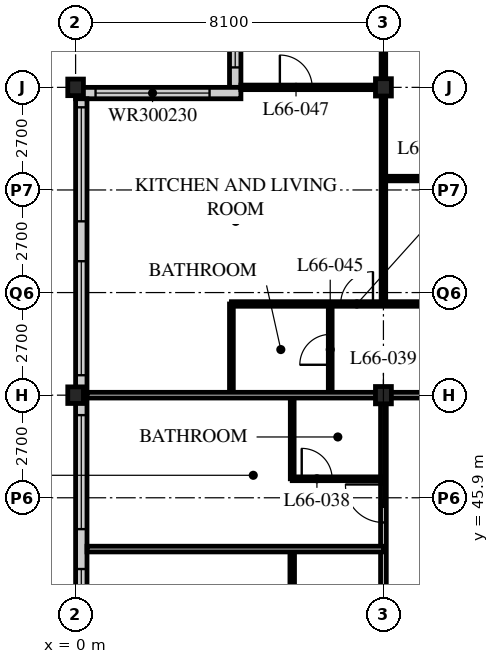
"""IFC4 building model, lengths in metres.
Left out: names, types, materials, properties, quantities, classifications, styles, units other than length and angle.
Written with IfcOpenShell. Run it as: python <this file> out.ifc"""

import sys

from ifc_helpers import new_model, si_unit, direction, frame, frame_2d, origin, origin_2d, place, context, subcontext, project, spatial, rectangle, i_section, extrude, element, fill, save


model = new_model("IFC4")
c1 = context("Model", 3, precision=1e-05, world=origin(), true_north=direction((0.0, 1.0)))
c2 = subcontext(c1, "Body", "Model", "MODEL_VIEW")
j1 = project(units=[si_unit("LENGTHUNIT", "METRE"), si_unit("PLANEANGLEUNIT", "RADIAN")], contexts=[c1])
p1 = place(None, origin())
s1 = spatial("IfcSite", under=j1, at=p1, CompositionType="ELEMENT")
p2 = place(p1, origin())
s2 = spatial("IfcBuilding", under=s1, at=p2, CompositionType="ELEMENT")
p3 = place(p2, frame((0.0, 0.0, 258.0)))
s3 = spatial("IfcBuildingStorey", under=s2, at=p3, CompositionType="ELEMENT", Elevation=258.0)
for number, where, z_axis, x_axis in (
    (1, (0.0, 48.6, 0.0), (0.0, 0.0, 1.0), (1.0, 0.0, 0.0)),
    (2, (0.0, 56.7, 0.0), (0.0, 0.0, 1.0), (1.0, 0.0, 0.0)),
):
    element("IfcColumn", number, at=place(p3, frame(where, z_axis=z_axis, x_axis=x_axis)), inside=s3, PredefinedType="COLUMN", context=c2, shape_type="SweptSolid", body=[
        extrude(i_section(OverallWidth=0.412, OverallDepth=0.437, WebThickness=0.036, FlangeThickness=0.058, FilletRadius=0.015, at=origin_2d()), origin(), (0.0, 0.0, 1.0), 3.9),
    ])
for number, where, z_axis, x_axis in (
    (3, (8.1, 48.6, 0.0), (0.0, 0.0, 1.0), (1.0, 0.0, 0.0)),
    (4, (8.1, 56.7, 0.0), (0.0, 0.0, 1.0), (1.0, 0.0, 0.0)),
):
    element("IfcColumn", number, at=place(p3, frame(where, z_axis=z_axis, x_axis=x_axis)), inside=s3, PredefinedType="COLUMN", context=c2, shape_type="SweptSolid", body=[
        extrude(i_section(OverallWidth=0.418, OverallDepth=0.456, WebThickness=0.042, FlangeThickness=0.067, FilletRadius=0.015, at=origin_2d()), origin(), (0.0, 0.0, 1.0), 3.9),
    ])
p4 = place(p3, frame((4.2, 60.45, 0.0), z_axis=(0.0, 0.0, 1.0), x_axis=(0.0, -1.0, 0.0)))
e5 = element("IfcWall", 5, at=p4, inside=s3, PredefinedType="SOLIDWALL", context=c2, shape_type="SweptSolid", body=[
    extrude(rectangle(XDim=3.75, YDim=0.3, at=frame_2d((1.875, 0.0))), origin(), (0.0, 0.0, 1.0), 3.69),
])
p5 = place(p4, frame((0.225, 0.0, 0.6)))
e6 = element("IfcOpeningElement", 6, at=p5, cuts=e5, PredefinedType="OPENING", context=c2, shape_type="SweptSolid", body=[
    extrude(rectangle(XDim=3.0, YDim=2.3, at=frame_2d((1.5, 1.15))), frame((0.0, 0.16, 0.0), z_axis=(0.0, -1.0, 0.0), x_axis=(1.0, 0.0, 0.0)), (0.0, 0.0, 1.0), 0.32),
])
p6 = place(p3, frame((4.35, 56.55, 0.0), z_axis=(0.0, 0.0, 1.0), x_axis=(-1.0, 0.0, 0.0)))
e7 = element("IfcWall", 7, at=p6, inside=s3, PredefinedType="SOLIDWALL", context=c2, shape_type="SweptSolid", body=[
    extrude(rectangle(XDim=4.35, YDim=0.3, at=frame_2d((2.175, 0.0))), origin(), (0.0, 0.0, 1.0), 3.69),
])
p7 = place(p6, frame((0.825, 0.0, 0.6)))
e8 = element("IfcOpeningElement", 8, at=p7, cuts=e7, PredefinedType="OPENING", context=c2, shape_type="SweptSolid", body=[
    extrude(rectangle(XDim=3.0, YDim=2.3, at=frame_2d((1.5, 1.15))), frame((0.0, 0.16, 0.0), z_axis=(0.0, -1.0, 0.0), x_axis=(1.0, 0.0, 0.0)), (0.0, 0.0, 1.0), 0.32),
])
p8 = place(p3, frame((0.15, 56.4, 0.0), z_axis=(0.0, 0.0, 1.0), x_axis=(0.0, -1.0, 0.0)))
e9 = element("IfcWall", 9, at=p8, inside=s3, PredefinedType="SOLIDWALL", context=c2, shape_type="SweptSolid", body=[
    extrude(rectangle(XDim=32.1, YDim=0.3, at=frame_2d((16.05, 0.0))), origin(), (0.0, 0.0, 1.0), 3.69),
])
p9 = place(p8, frame((0.225, 0.0, 0.6)))
e10 = element("IfcOpeningElement", 10, at=p9, cuts=e9, PredefinedType="OPENING", context=c2, shape_type="SweptSolid", body=[
    extrude(rectangle(XDim=3.0, YDim=2.4, at=frame_2d((1.5, 1.2))), frame((0.0, 0.16, 0.0), z_axis=(0.0, -1.0, 0.0), x_axis=(1.0, 0.0, 0.0)), (0.0, 0.0, 1.0), 0.32),
])
p10 = place(p8, frame((4.275, 0.0, 0.6)))
e11 = element("IfcOpeningElement", 11, at=p10, cuts=e9, PredefinedType="OPENING", context=c2, shape_type="SweptSolid", body=[
    extrude(rectangle(XDim=3.0, YDim=2.4, at=frame_2d((1.5, 1.2))), frame((0.0, 0.16, 0.0), z_axis=(0.0, -1.0, 0.0), x_axis=(1.0, 0.0, 0.0)), (0.0, 0.0, 1.0), 0.32),
])
p11 = place(p8, frame((8.325, 0.0, 0.6)))
e12 = element("IfcOpeningElement", 12, at=p11, cuts=e9, PredefinedType="OPENING", context=c2, shape_type="SweptSolid", body=[
    extrude(rectangle(XDim=3.0, YDim=2.4, at=frame_2d((1.5, 1.2))), frame((0.0, 0.16, 0.0), z_axis=(0.0, -1.0, 0.0), x_axis=(1.0, 0.0, 0.0)), (0.0, 0.0, 1.0), 0.32),
])
p12 = place(p8, frame((12.375, 0.0, 0.6)))
e13 = element("IfcOpeningElement", 13, at=p12, cuts=e9, PredefinedType="OPENING", context=c2, shape_type="SweptSolid", body=[
    extrude(rectangle(XDim=3.0, YDim=2.4, at=frame_2d((1.5, 1.2))), frame((0.0, 0.16, 0.0), z_axis=(0.0, -1.0, 0.0), x_axis=(1.0, 0.0, 0.0)), (0.0, 0.0, 1.0), 0.32),
])
p13 = place(p8, frame((16.425, 0.0, 0.6)))
e14 = element("IfcOpeningElement", 14, at=p13, cuts=e9, PredefinedType="OPENING", context=c2, shape_type="SweptSolid", body=[
    extrude(rectangle(XDim=3.0, YDim=2.4, at=frame_2d((1.5, 1.2))), frame((0.0, 0.16, 0.0), z_axis=(0.0, -1.0, 0.0), x_axis=(1.0, 0.0, 0.0)), (0.0, 0.0, 1.0), 0.32),
])
p14 = place(p8, frame((20.475, 0.0, 0.6)))
e15 = element("IfcOpeningElement", 15, at=p14, cuts=e9, PredefinedType="OPENING", context=c2, shape_type="SweptSolid", body=[
    extrude(rectangle(XDim=3.0, YDim=2.4, at=frame_2d((1.5, 1.2))), frame((0.0, 0.16, 0.0), z_axis=(0.0, -1.0, 0.0), x_axis=(1.0, 0.0, 0.0)), (0.0, 0.0, 1.0), 0.32),
])
p15 = place(p8, frame((24.525, 0.0, 0.6)))
e16 = element("IfcOpeningElement", 16, at=p15, cuts=e9, PredefinedType="OPENING", context=c2, shape_type="SweptSolid", body=[
    extrude(rectangle(XDim=3.0, YDim=2.4, at=frame_2d((1.5, 1.2))), frame((0.0, 0.16, 0.0), z_axis=(0.0, -1.0, 0.0), x_axis=(1.0, 0.0, 0.0)), (0.0, 0.0, 1.0), 0.32),
])
p16 = place(p8, frame((28.575, 0.0, 0.6)))
e17 = element("IfcOpeningElement", 17, at=p16, cuts=e9, PredefinedType="OPENING", context=c2, shape_type="SweptSolid", body=[
    extrude(rectangle(XDim=3.0, YDim=2.4, at=frame_2d((1.5, 1.2))), frame((0.0, 0.16, 0.0), z_axis=(0.0, -1.0, 0.0), x_axis=(1.0, 0.0, 0.0)), (0.0, 0.0, 1.0), 0.32),
])
p17 = place(p3, frame((8.1, 48.6, 0.0), z_axis=(0.0, 0.0, 1.0), x_axis=(1.0, 0.0, 0.0)))
e18 = element("IfcWall", 18, at=p17, inside=s3, PredefinedType="PARTITIONING", context=c2, shape_type="SweptSolid", body=[
    extrude(rectangle(XDim=28.35, YDim=0.15, at=frame_2d((14.175, 0.0))), origin(), (0.0, 0.0, 1.0), 3.078),
])
p18 = place(p17, frame((4.45, 0.0, 0.0)))
e19 = element("IfcOpeningElement", 19, at=p18, cuts=e18, PredefinedType="OPENING", context=c2, shape_type="SweptSolid", body=[
    extrude(rectangle(XDim=1.0, YDim=2.1, at=frame_2d((0.5, 1.05))), frame((0.0, 0.085, 0.0), z_axis=(0.0, -1.0, 0.0), x_axis=(1.0, 0.0, 0.0)), (0.0, 0.0, 1.0), 0.17),
])
p19 = place(p17, frame((20.65, 0.0, 0.0)))
e20 = element("IfcOpeningElement", 20, at=p19, cuts=e18, PredefinedType="OPENING", context=c2, shape_type="SweptSolid", body=[
    extrude(rectangle(XDim=1.0, YDim=2.1, at=frame_2d((0.5, 1.05))), frame((0.0, 0.085, 0.0), z_axis=(0.0, -1.0, 0.0), x_axis=(1.0, 0.0, 0.0)), (0.0, 0.0, 1.0), 0.17),
])
p20 = place(p17, frame((1.525, 0.0, 0.0)))
e21 = element("IfcOpeningElement", 21, at=p20, cuts=e18, PredefinedType="OPENING", context=c2, shape_type="SweptSolid", body=[
    extrude(rectangle(XDim=1.0, YDim=2.1, at=frame_2d((0.5, 1.05))), frame((0.0, 0.085, 0.0), z_axis=(0.0, -1.0, 0.0), x_axis=(1.0, 0.0, 0.0)), (0.0, 0.0, 1.0), 0.17),
])
p21 = place(p3, frame((8.1, 22.5, 0.0), z_axis=(0.0, 0.0, 1.0), x_axis=(0.0, 1.0, 0.0)))
e22 = element("IfcWall", 22, at=p21, inside=s3, PredefinedType="PARTITIONING", context=c2, shape_type="SweptSolid", body=[
    extrude(rectangle(XDim=26.1, YDim=0.15, at=frame_2d((13.05, 0.0))), origin(), (0.0, 0.0, 1.0), 3.078),
])
p22 = place(p21, frame((2.65, 0.0, 0.0)))
e23 = element("IfcOpeningElement", 23, at=p22, cuts=e22, PredefinedType="OPENING", context=c2, shape_type="SweptSolid", body=[
    extrude(rectangle(XDim=1.0, YDim=2.1, at=frame_2d((0.5, 1.05))), frame((0.0, 0.085, 0.0), z_axis=(0.0, -1.0, 0.0), x_axis=(1.0, 0.0, 0.0)), (0.0, 0.0, 1.0), 0.17),
])
p23 = place(p21, frame((22.75, 0.0, 0.0)))
e24 = element("IfcOpeningElement", 24, at=p23, cuts=e22, PredefinedType="OPENING", context=c2, shape_type="SweptSolid", body=[
    extrude(rectangle(XDim=1.0, YDim=2.1, at=frame_2d((0.5, 1.05))), frame((0.0, 0.085, 0.0), z_axis=(0.0, -1.0, 0.0), x_axis=(1.0, 0.0, 0.0)), (0.0, 0.0, 1.0), 0.17),
])
p24 = place(p3, frame((5.7, 22.5, 0.0), z_axis=(0.0, 0.0, 1.0), x_axis=(0.0, 1.0, 0.0)))
e25 = element("IfcWall", 25, at=p24, inside=s3, PredefinedType="PARTITIONING", context=c2, shape_type="SweptSolid", body=[
    extrude(rectangle(XDim=22.05, YDim=0.12, at=frame_2d((11.025, 0.0))), origin(), (0.0, 0.0, 1.0), 3.69),
])
p25 = place(p24, frame((0.975, 0.0, 0.0)))
e26 = element("IfcOpeningElement", 26, at=p25, cuts=e25, PredefinedType="OPENING", context=c2, shape_type="SweptSolid", body=[
    extrude(rectangle(XDim=0.85, YDim=2.1, at=frame_2d((0.425, 1.05))), frame((0.0, 0.07, 0.0), z_axis=(0.0, -1.0, 0.0), x_axis=(1.0, 0.0, 0.0)), (0.0, 0.0, 1.0), 0.14),
])
p26 = place(p24, frame((10.225, 0.0, 0.0)))
e27 = element("IfcOpeningElement", 27, at=p26, cuts=e25, PredefinedType="OPENING", context=c2, shape_type="SweptSolid", body=[
    extrude(rectangle(XDim=0.85, YDim=2.1, at=frame_2d((0.425, 1.05))), frame((0.0, 0.07, 0.0), z_axis=(0.0, -1.0, 0.0), x_axis=(1.0, 0.0, 0.0)), (0.0, 0.0, 1.0), 0.14),
])
p27 = place(p24, frame((14.275, 0.0, 0.0)))
e28 = element("IfcOpeningElement", 28, at=p27, cuts=e25, PredefinedType="OPENING", context=c2, shape_type="SweptSolid", body=[
    extrude(rectangle(XDim=0.85, YDim=2.1, at=frame_2d((0.425, 1.05))), frame((0.0, 0.07, 0.0), z_axis=(0.0, -1.0, 0.0), x_axis=(1.0, 0.0, 0.0)), (0.0, 0.0, 1.0), 0.14),
])
p28 = place(p24, frame((18.325, 0.0, 0.0)))
e29 = element("IfcOpeningElement", 29, at=p28, cuts=e25, PredefinedType="OPENING", context=c2, shape_type="SweptSolid", body=[
    extrude(rectangle(XDim=0.85, YDim=2.1, at=frame_2d((0.425, 1.05))), frame((0.0, 0.07, 0.0), z_axis=(0.0, -1.0, 0.0), x_axis=(1.0, 0.0, 0.0)), (0.0, 0.0, 1.0), 0.14),
])
p29 = place(p3, frame((8.1, 44.55, 0.0), z_axis=(0.0, 0.0, 1.0), x_axis=(-1.0, 0.0, 0.0)))
e30 = element("IfcWall", 30, at=p29, inside=s3, PredefinedType="PARTITIONING", context=c2, shape_type="SweptSolid", body=[
    extrude(rectangle(XDim=7.8, YDim=0.15, at=frame_2d((3.9, 0.0))), origin(), (0.0, 0.0, 1.0), 3.69),
])
p30 = place(p3, frame((5.7, 46.4, 0.0), z_axis=(0.0, 0.0, 1.0), x_axis=(0.0, 1.0, 0.0)))
e31 = element("IfcWall", 31, at=p30, inside=s3, PredefinedType="PARTITIONING", context=c2, shape_type="SweptSolid", body=[
    extrude(rectangle(XDim=2.2, YDim=0.1, at=frame_2d((1.1, 0.0))), origin(), (0.0, 0.0, 1.0), 3.69),
])
p31 = place(p3, frame((8.1, 46.4, 0.0), z_axis=(0.0, 0.0, 1.0), x_axis=(-1.0, 0.0, 0.0)))
e32 = element("IfcWall", 32, at=p31, inside=s3, PredefinedType="PARTITIONING", context=c2, shape_type="SweptSolid", body=[
    extrude(rectangle(XDim=2.4, YDim=0.1, at=frame_2d((1.2, 0.0))), origin(), (0.0, 0.0, 1.0), 3.69),
])
p32 = place(p31, frame((1.35, 0.0, 0.0)))
e33 = element("IfcOpeningElement", 33, at=p32, cuts=e32, PredefinedType="OPENING", context=c2, shape_type="SweptSolid", body=[
    extrude(rectangle(XDim=0.8, YDim=2.1, at=frame_2d((0.4, 1.05))), frame((0.0, 0.06, 0.0), z_axis=(0.0, -1.0, 0.0), x_axis=(1.0, 0.0, 0.0)), (0.0, 0.0, 1.0), 0.12),
])
p33 = place(p3, frame((6.7, 48.6, 0.0), z_axis=(0.0, 0.0, 1.0), x_axis=(0.0, 1.0, 0.0)))
e34 = element("IfcWall", 34, at=p33, inside=s3, PredefinedType="PARTITIONING", context=c2, shape_type="SweptSolid", body=[
    extrude(rectangle(XDim=2.4, YDim=0.1, at=frame_2d((1.2, 0.0))), origin(), (0.0, 0.0, 1.0), 3.69),
])
p34 = place(p33, frame((0.8, 0.0, 0.0)))
e35 = element("IfcOpeningElement", 35, at=p34, cuts=e34, PredefinedType="OPENING", context=c2, shape_type="SweptSolid", body=[
    extrude(rectangle(XDim=0.8, YDim=2.1, at=frame_2d((0.4, 1.05))), frame((0.0, 0.06, 0.0), z_axis=(0.0, -1.0, 0.0), x_axis=(1.0, 0.0, 0.0)), (0.0, 0.0, 1.0), 0.12),
])
p35 = place(p3, frame((4.1, 48.6, 0.0), z_axis=(0.0, 0.0, 1.0), x_axis=(0.0, 1.0, 0.0)))
e36 = element("IfcWall", 36, at=p35, inside=s3, PredefinedType="PARTITIONING", context=c2, shape_type="SweptSolid", body=[
    extrude(rectangle(XDim=2.4, YDim=0.1, at=frame_2d((1.2, 0.0))), origin(), (0.0, 0.0, 1.0), 3.69),
])
p36 = place(p3, frame((4.1, 51.0, 0.0), z_axis=(0.0, 0.0, 1.0), x_axis=(1.0, 0.0, 0.0)))
e37 = element("IfcWall", 37, at=p36, inside=s3, PredefinedType="PARTITIONING", context=c2, shape_type="SweptSolid", body=[
    extrude(rectangle(XDim=32.35, YDim=0.12, at=frame_2d((16.175, 0.0))), origin(), (0.0, 0.0, 1.0), 3.69),
])
p37 = place(p36, frame((9.025, 0.0, 0.0)))
e38 = element("IfcOpeningElement", 38, at=p37, cuts=e37, PredefinedType="OPENING", context=c2, shape_type="SweptSolid", body=[
    extrude(rectangle(XDim=0.85, YDim=2.1, at=frame_2d((0.425, 1.05))), frame((0.0, 0.07, 0.0), z_axis=(0.0, -1.0, 0.0), x_axis=(1.0, 0.0, 0.0)), (0.0, 0.0, 1.0), 0.14),
])
p38 = place(p36, frame((16.475, 0.0, 0.0)))
e39 = element("IfcOpeningElement", 39, at=p38, cuts=e37, PredefinedType="OPENING", context=c2, shape_type="SweptSolid", body=[
    extrude(rectangle(XDim=0.85, YDim=2.1, at=frame_2d((0.425, 1.05))), frame((0.0, 0.07, 0.0), z_axis=(0.0, -1.0, 0.0), x_axis=(1.0, 0.0, 0.0)), (0.0, 0.0, 1.0), 0.14),
])
p39 = place(p36, frame((20.525, 0.0, 0.0)))
e40 = element("IfcOpeningElement", 40, at=p39, cuts=e37, PredefinedType="OPENING", context=c2, shape_type="SweptSolid", body=[
    extrude(rectangle(XDim=0.85, YDim=2.1, at=frame_2d((0.425, 1.05))), frame((0.0, 0.07, 0.0), z_axis=(0.0, -1.0, 0.0), x_axis=(1.0, 0.0, 0.0)), (0.0, 0.0, 1.0), 0.14),
])
p40 = place(p36, frame((25.225, 0.0, 0.0)))
e41 = element("IfcOpeningElement", 41, at=p40, cuts=e37, PredefinedType="OPENING", context=c2, shape_type="SweptSolid", body=[
    extrude(rectangle(XDim=0.85, YDim=2.1, at=frame_2d((0.425, 1.05))), frame((0.0, 0.07, 0.0), z_axis=(0.0, -1.0, 0.0), x_axis=(1.0, 0.0, 0.0)), (0.0, 0.0, 1.0), 0.14),
])
p41 = place(p36, frame((28.625, 0.0, 0.0)))
e42 = element("IfcOpeningElement", 42, at=p41, cuts=e37, PredefinedType="OPENING", context=c2, shape_type="SweptSolid", body=[
    extrude(rectangle(XDim=0.85, YDim=2.1, at=frame_2d((0.425, 1.05))), frame((0.0, 0.07, 0.0), z_axis=(0.0, -1.0, 0.0), x_axis=(1.0, 0.0, 0.0)), (0.0, 0.0, 1.0), 0.14),
])
p42 = place(p36, frame((6.725, 0.0, 0.0)))
e43 = element("IfcOpeningElement", 43, at=p42, cuts=e37, PredefinedType="OPENING", context=c2, shape_type="SweptSolid", body=[
    extrude(rectangle(XDim=0.85, YDim=2.1, at=frame_2d((0.425, 1.05))), frame((0.0, 0.07, 0.0), z_axis=(0.0, -1.0, 0.0), x_axis=(1.0, 0.0, 0.0)), (0.0, 0.0, 1.0), 0.14),
])
p43 = place(p36, frame((2.875, 0.0, 0.0)))
e44 = element("IfcOpeningElement", 44, at=p43, cuts=e37, PredefinedType="OPENING", context=c2, shape_type="SweptSolid", body=[
    extrude(rectangle(XDim=0.85, YDim=2.1, at=frame_2d((0.425, 1.05))), frame((0.0, 0.07, 0.0), z_axis=(0.0, -1.0, 0.0), x_axis=(1.0, 0.0, 0.0)), (0.0, 0.0, 1.0), 0.14),
])
p44 = place(p3, frame((8.1, 51.0, 0.0), z_axis=(0.0, 0.0, 1.0), x_axis=(0.0, 1.0, 0.0)))
e45 = element("IfcWall", 45, at=p44, inside=s3, PredefinedType="PARTITIONING", context=c2, shape_type="SweptSolid", body=[
    extrude(rectangle(XDim=9.45, YDim=0.12, at=frame_2d((4.725, 0.0))), origin(), (0.0, 0.0, 1.0), 3.078),
])
p45 = place(p3, frame((8.1, 56.7, 0.0), z_axis=(0.0, 0.0, 1.0), x_axis=(-1.0, 0.0, 0.0)))
e46 = element("IfcWall", 46, at=p45, inside=s3, PredefinedType="PARTITIONING", context=c2, shape_type="SweptSolid", body=[
    extrude(rectangle(XDim=3.75, YDim=0.12, at=frame_2d((1.875, 0.0))), origin(), (0.0, 0.0, 1.0), 3.078),
])
p46 = place(p45, frame((1.875, 0.0, 0.0)))
e47 = element("IfcOpeningElement", 47, at=p46, cuts=e46, PredefinedType="OPENING", context=c2, shape_type="SweptSolid", body=[
    extrude(rectangle(XDim=0.85, YDim=2.1, at=frame_2d((0.425, 1.05))), frame((0.0, 0.07, 0.0), z_axis=(0.0, -1.0, 0.0), x_axis=(1.0, 0.0, 0.0)), (0.0, 0.0, 1.0), 0.14),
])
p47 = place(p3, frame((0.3, 48.6, 0.0), z_axis=(0.0, 0.0, 1.0), x_axis=(1.0, 0.0, 0.0)))
e48 = element("IfcWall", 48, at=p47, inside=s3, PredefinedType="PARTITIONING", context=c2, shape_type="SweptSolid", body=[
    extrude(rectangle(XDim=7.8, YDim=0.15, at=frame_2d((3.9, 0.0))), origin(), (0.0, 0.0, 1.0), 3.078),
])
p48 = place(p3, frame((8.1, 54.3, 0.0), z_axis=(0.0, 0.0, 1.0), x_axis=(1.0, 0.0, 0.0)))
e49 = element("IfcWall", 49, at=p48, inside=s3, PredefinedType="PARTITIONING", context=c2, shape_type="SweptSolid", body=[
    extrude(rectangle(XDim=4.05, YDim=0.12, at=frame_2d((2.025, 0.0))), origin(), (0.0, 0.0, 1.0), 3.69),
])
p49 = place(p48, frame((1.6, 0.0, 0.0)))
e50 = element("IfcOpeningElement", 50, at=p49, cuts=e49, PredefinedType="OPENING", context=c2, shape_type="SweptSolid", body=[
    extrude(rectangle(XDim=0.85, YDim=2.1, at=frame_2d((0.425, 1.05))), frame((0.0, 0.07, 0.0), z_axis=(0.0, -1.0, 0.0), x_axis=(1.0, 0.0, 0.0)), (0.0, 0.0, 1.0), 0.14),
])
p50 = place(p5, origin())
e51 = element("IfcWindow", 51, at=p50, inside=s3, PartitioningType="SINGLE_PANEL", PredefinedType="WINDOW", context=c2, shape_type="SweptSolid", body=[
    extrude(rectangle(XDim=3.0, YDim=2.3, at=frame_2d((1.5, 1.15))), frame((0.0, 0.03, 0.0), z_axis=(0.0, -1.0, 0.0), x_axis=(1.0, 0.0, 0.0)), (0.0, 0.0, 1.0), 0.06),
])
fill(e6, e51)
p51 = place(p7, origin())
e52 = element("IfcWindow", 52, at=p51, inside=s3, PartitioningType="SINGLE_PANEL", PredefinedType="WINDOW", context=c2, shape_type="SweptSolid", body=[
    extrude(rectangle(XDim=3.0, YDim=2.3, at=frame_2d((1.5, 1.15))), frame((0.0, 0.03, 0.0), z_axis=(0.0, -1.0, 0.0), x_axis=(1.0, 0.0, 0.0)), (0.0, 0.0, 1.0), 0.06),
])
fill(e8, e52)
p52 = place(p9, origin())
e53 = element("IfcWindow", 53, at=p52, inside=s3, PartitioningType="SINGLE_PANEL", PredefinedType="WINDOW", context=c2, shape_type="SweptSolid", body=[
    extrude(rectangle(XDim=3.0, YDim=2.4, at=frame_2d((1.5, 1.2))), frame((0.0, 0.03, 0.0), z_axis=(0.0, -1.0, 0.0), x_axis=(1.0, 0.0, 0.0)), (0.0, 0.0, 1.0), 0.06),
])
fill(e10, e53)
p53 = place(p10, origin())
e54 = element("IfcWindow", 54, at=p53, inside=s3, PartitioningType="SINGLE_PANEL", PredefinedType="WINDOW", context=c2, shape_type="SweptSolid", body=[
    extrude(rectangle(XDim=3.0, YDim=2.4, at=frame_2d((1.5, 1.2))), frame((0.0, 0.03, 0.0), z_axis=(0.0, -1.0, 0.0), x_axis=(1.0, 0.0, 0.0)), (0.0, 0.0, 1.0), 0.06),
])
fill(e11, e54)
p54 = place(p11, origin())
e55 = element("IfcWindow", 55, at=p54, inside=s3, PartitioningType="SINGLE_PANEL", PredefinedType="WINDOW", context=c2, shape_type="SweptSolid", body=[
    extrude(rectangle(XDim=3.0, YDim=2.4, at=frame_2d((1.5, 1.2))), frame((0.0, 0.03, 0.0), z_axis=(0.0, -1.0, 0.0), x_axis=(1.0, 0.0, 0.0)), (0.0, 0.0, 1.0), 0.06),
])
fill(e12, e55)
p55 = place(p12, origin())
e56 = element("IfcWindow", 56, at=p55, inside=s3, PartitioningType="SINGLE_PANEL", PredefinedType="WINDOW", context=c2, shape_type="SweptSolid", body=[
    extrude(rectangle(XDim=3.0, YDim=2.4, at=frame_2d((1.5, 1.2))), frame((0.0, 0.03, 0.0), z_axis=(0.0, -1.0, 0.0), x_axis=(1.0, 0.0, 0.0)), (0.0, 0.0, 1.0), 0.06),
])
fill(e13, e56)
p56 = place(p32, origin())
e57 = element("IfcDoor", 57, at=p56, inside=s3, OperationType="SINGLE_SWING_LEFT", PredefinedType="DOOR", context=c2, shape_type="SweptSolid", body=[
    extrude(rectangle(XDim=0.8, YDim=2.1, at=frame_2d((0.4, 1.05))), frame((0.0, 0.025, 0.0), z_axis=(0.0, -1.0, 0.0), x_axis=(1.0, 0.0, 0.0)), (0.0, 0.0, 1.0), 0.05),
])
fill(e33, e57)
p57 = place(p23, origin())
e58 = element("IfcDoor", 58, at=p57, inside=s3, OperationType="SINGLE_SWING_RIGHT", PredefinedType="DOOR", context=c2, shape_type="SweptSolid", body=[
    extrude(rectangle(XDim=1.0, YDim=2.1, at=frame_2d((0.5, 1.05))), frame((0.0, 0.025, 0.0), z_axis=(0.0, -1.0, 0.0), x_axis=(1.0, 0.0, 0.0)), (0.0, 0.0, 1.0), 0.05),
])
fill(e24, e58)
p58 = place(p34, origin())
e59 = element("IfcDoor", 59, at=p58, inside=s3, OperationType="SINGLE_SWING_LEFT", PredefinedType="DOOR", context=c2, shape_type="SweptSolid", body=[
    extrude(rectangle(XDim=0.8, YDim=2.1, at=frame_2d((0.4, 1.05))), frame((0.0, 0.025, 0.0), z_axis=(0.0, -1.0, 0.0), x_axis=(1.0, 0.0, 0.0)), (0.0, 0.0, 1.0), 0.05),
])
fill(e35, e59)
p59 = place(p43, origin())
e60 = element("IfcDoor", 60, at=p59, inside=s3, OperationType="SINGLE_SWING_RIGHT", PredefinedType="DOOR", context=c2, shape_type="SweptSolid", body=[
    extrude(rectangle(XDim=0.85, YDim=2.1, at=frame_2d((0.425, 1.05))), frame((0.0, 0.025, 0.0), z_axis=(0.0, -1.0, 0.0), x_axis=(1.0, 0.0, 0.0)), (0.0, 0.0, 1.0), 0.05),
])
fill(e44, e60)
p60 = place(p46, origin())
e61 = element("IfcDoor", 61, at=p60, inside=s3, OperationType="SINGLE_SWING_LEFT", PredefinedType="DOOR", context=c2, shape_type="SweptSolid", body=[
    extrude(rectangle(XDim=0.85, YDim=2.1, at=frame_2d((0.425, 1.05))), frame((0.0, 0.025, 0.0), z_axis=(0.0, -1.0, 0.0), x_axis=(1.0, 0.0, 0.0)), (0.0, 0.0, 1.0), 0.05),
])
fill(e47, e61)
save(model, sys.argv[1])
